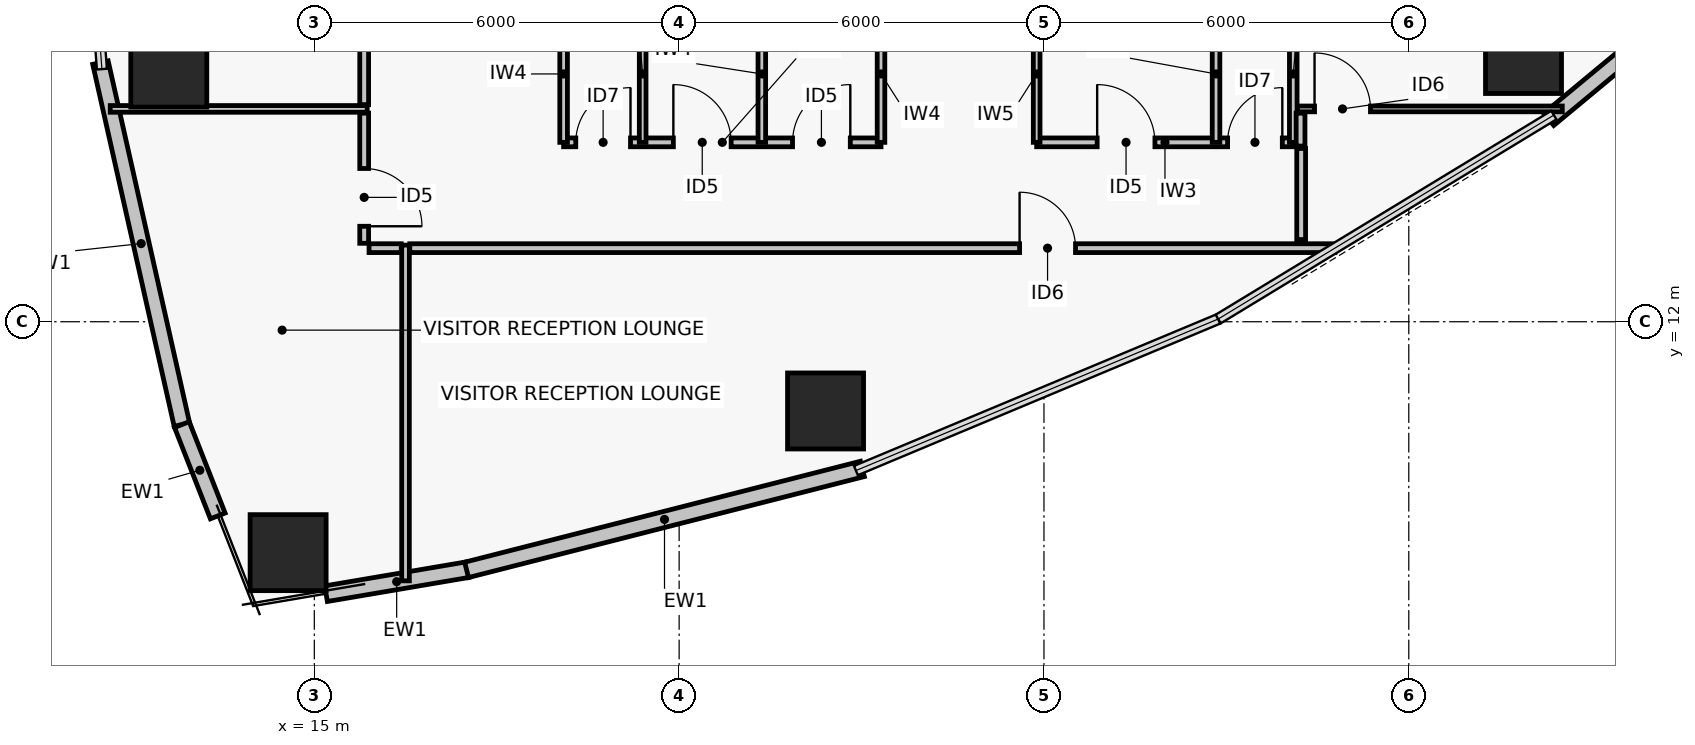
"""IFC4 building model, lengths in metres.
Left out: names, types, materials, properties, quantities, classifications, styles, units other than length and angle.
Written with IfcOpenShell. Run it as: python <this file> out.ifc"""

import sys

from ifc_helpers import new_model, si_unit, direction, frame, frame_2d, origin, origin_2d, place, context, subcontext, project, spatial, rectangle, hollow_rectangle, extrude, element, fill, save


model = new_model("IFC4")
c1 = context("Model", 3, precision=1e-05, world=origin(), true_north=direction((0.0, 1.0)))
c2 = subcontext(c1, "Body", "Model", "MODEL_VIEW")
j1 = project(units=[si_unit("LENGTHUNIT", "METRE"), si_unit("PLANEANGLEUNIT", "RADIAN")], contexts=[c1])
p1 = place(None, origin())
s1 = spatial("IfcSite", under=j1, at=p1, CompositionType="ELEMENT")
p2 = place(p1, origin())
s2 = spatial("IfcBuilding", under=s1, at=p2, CompositionType="ELEMENT")
p3 = place(p2, frame((0.0, 0.0, 75.96)))
s3 = spatial("IfcBuildingStorey", under=s2, at=p3, CompositionType="ELEMENT", Elevation=75.96)
for number, where, z_axis, x_axis in (
    (1, (12.607, 16.154, 0.0), (0.0, 0.0, 1.0), (1.0, 0.0, 0.0)),
    (2, (14.569, 8.203, 0.0), (0.0, 0.0, 1.0), (1.0, 0.0, 0.0)),
    (3, (23.408, 10.533, 0.0), (0.0, 0.0, 1.0), (1.0, 0.0, 0.0)),
    (4, (34.887, 16.378, 0.0), (0.0, 0.0, 1.0), (1.0, 0.0, 0.0)),
):
    element("IfcColumn", number, at=place(p3, frame(where, z_axis=z_axis, x_axis=x_axis)), inside=s3, PredefinedType="COLUMN", context=c2, shape_type="SweptSolid", body=[
        extrude(hollow_rectangle(XDim=1.25, YDim=1.25, WallThickness=0.05, at=origin_2d()), origin(), (0.0, 0.0, 1.0), 3.72),
    ])
p4 = place(p3, frame((12.822, 10.309, 0.0), z_axis=(0.0, 0.0, 1.0), x_axis=(-0.219535044336, 0.975604614743, 0.0)))
e5 = element("IfcWall", 5, at=p4, inside=s3, PredefinedType="PARTITIONING", context=c2, shape_type="SweptSolid", body=[
    extrude(rectangle(XDim=6.102, YDim=0.26, at=frame_2d((3.051, 0.0))), origin(), (0.0, 0.0, 1.0), 3.47),
])
p5 = place(p3, frame((13.412, 8.806, 0.0), z_axis=(0.0, 0.0, 1.0), x_axis=(-0.365488551504, 0.930815835018, 0.0)))
e6 = element("IfcWall", 6, at=p5, inside=s3, PredefinedType="PARTITIONING", context=c2, shape_type="SweptSolid", body=[
    extrude(rectangle(XDim=1.614, YDim=0.26, at=frame_2d((0.807, 0.0))), origin(), (0.0, 0.0, 1.0), 3.47),
])
p6 = place(p3, frame((17.516, 7.922, 0.0), z_axis=(0.0, 0.0, 1.0), x_axis=(-0.985905269947, -0.167304508875, 0.0)))
e7 = element("IfcWall", 7, at=p6, inside=s3, PredefinedType="PARTITIONING", context=c2, shape_type="SweptSolid", body=[
    extrude(rectangle(XDim=2.357, YDim=0.26, at=frame_2d((1.178, 0.0))), origin(), (0.0, 0.0, 1.0), 3.47),
])
p7 = place(p3, frame((24.014, 9.58, 0.0), z_axis=(0.0, 0.0, 1.0), x_axis=(-0.968981437296, -0.247133514876, 0.0)))
e8 = element("IfcWall", 8, at=p7, inside=s3, PredefinedType="PARTITIONING", context=c2, shape_type="SweptSolid", body=[
    extrude(rectangle(XDim=6.718, YDim=0.26, at=frame_2d((3.359, 0.0))), origin(), (0.0, 0.0, 1.0), 3.47),
])
p8 = place(p3, frame((40.472, 19.616, 0.0), z_axis=(0.0, 0.0, 1.0), x_axis=(-0.76975316947, -0.638341646841, 0.0)))
e9 = element("IfcWall", 9, at=p8, inside=s3, PredefinedType="PARTITIONING", context=c2, shape_type="SweptSolid", body=[
    extrude(rectangle(XDim=6.718, YDim=0.26, at=frame_2d((3.359, 0.0))), origin(), (0.0, 0.0, 1.0), 3.47),
])
p9 = place(p3, frame((19.1, 14.95, 0.0), z_axis=(0.0, 0.0, 1.0), x_axis=(1.0, 0.0, 0.0)))
e10 = element("IfcWall", 10, at=p9, inside=s3, PredefinedType="PARTITIONING", context=c2, shape_type="SweptSolid", body=[
    extrude(rectangle(XDim=5.22, YDim=0.145, at=frame_2d((2.61, 0.0))), origin(), (0.0, 0.0, 1.0), 2.6),
])
p10 = place(p9, frame((0.2, 0.0, 0.0)))
e11 = element("IfcOpeningElement", 11, at=p10, cuts=e10, PredefinedType="OPENING", context=c2, shape_type="SweptSolid", body=[
    extrude(rectangle(XDim=0.9, YDim=2.02, at=frame_2d((0.45, 1.01))), frame((0.0, 0.083, 0.0), z_axis=(0.0, -1.0, 0.0), x_axis=(1.0, 0.0, 0.0)), (0.0, 0.0, 1.0), 0.165),
])
p11 = place(p9, frame((1.805, 0.0, 0.0)))
e12 = element("IfcOpeningElement", 12, at=p11, cuts=e10, PredefinedType="OPENING", context=c2, shape_type="SweptSolid", body=[
    extrude(rectangle(XDim=0.95, YDim=2.06, at=frame_2d((0.475, 1.03))), frame((0.0, 0.083, 0.0), z_axis=(0.0, -1.0, 0.0), x_axis=(1.0, 0.0, 0.0)), (0.0, 0.0, 1.0), 0.165),
])
p12 = place(p9, frame((3.765, 0.0, 0.0)))
e13 = element("IfcOpeningElement", 13, at=p12, cuts=e10, PredefinedType="OPENING", context=c2, shape_type="SweptSolid", body=[
    extrude(rectangle(XDim=0.95, YDim=2.06, at=frame_2d((0.475, 1.03))), frame((0.0, 0.083, 0.0), z_axis=(0.0, -1.0, 0.0), x_axis=(1.0, 0.0, 0.0)), (0.0, 0.0, 1.0), 0.165),
])
p13 = place(p3, frame((26.88, 14.95, 0.0), z_axis=(0.0, 0.0, 1.0), x_axis=(1.0, 0.0, 0.0)))
e14 = element("IfcWall", 14, at=p13, inside=s3, PredefinedType="PARTITIONING", context=c2, shape_type="SweptSolid", body=[
    extrude(rectangle(XDim=4.22, YDim=0.145, at=frame_2d((2.11, 0.0))), origin(), (0.0, 0.0, 1.0), 3.0),
])
p14 = place(p13, frame((0.995, 0.0, 0.0)))
e15 = element("IfcOpeningElement", 15, at=p14, cuts=e14, PredefinedType="OPENING", context=c2, shape_type="SweptSolid", body=[
    extrude(rectangle(XDim=0.95, YDim=2.06, at=frame_2d((0.475, 1.03))), frame((0.0, 0.083, 0.0), z_axis=(0.0, -1.0, 0.0), x_axis=(1.0, 0.0, 0.0)), (0.0, 0.0, 1.0), 0.165),
])
p15 = place(p13, frame((3.14, 0.0, 0.0)))
e16 = element("IfcOpeningElement", 16, at=p15, cuts=e14, PredefinedType="OPENING", context=c2, shape_type="SweptSolid", body=[
    extrude(rectangle(XDim=0.9, YDim=2.02, at=frame_2d((0.45, 1.01))), frame((0.0, 0.083, 0.0), z_axis=(0.0, -1.0, 0.0), x_axis=(1.0, 0.0, 0.0)), (0.0, 0.0, 1.0), 0.165),
])
p16 = place(p3, frame((19.1, 14.95, 0.0), z_axis=(0.0, 0.0, 1.0), x_axis=(0.0, 1.0, 0.0)))
e17 = element("IfcWall", 17, at=p16, inside=s3, PredefinedType="PARTITIONING", context=c2, shape_type="SweptSolid", body=[
    extrude(rectangle(XDim=2.25, YDim=0.125, at=frame_2d((1.125, 0.0))), origin(), (0.0, 0.0, 1.0), 2.6),
])
p17 = place(p3, frame((20.4, 14.95, 0.0), z_axis=(0.0, 0.0, 1.0), x_axis=(0.0, 1.0, 0.0)))
e18 = element("IfcWall", 18, at=p17, inside=s3, PredefinedType="PARTITIONING", context=c2, shape_type="SweptSolid", body=[
    extrude(rectangle(XDim=2.25, YDim=0.11, at=frame_2d((1.125, 0.0))), origin(), (0.0, 0.0, 1.0), 2.6),
])
for number, where, z_axis, x_axis in (
    (19, (22.36, 14.95, 0.0), (0.0, 0.0, 1.0), (0.0, 1.0, 0.0)),
    (20, (24.32, 14.95, 0.0), (0.0, 0.0, 1.0), (0.0, 1.0, 0.0)),
):
    element("IfcWall", number, at=place(p3, frame(where, z_axis=z_axis, x_axis=x_axis)), inside=s3, PredefinedType="PARTITIONING", context=c2, shape_type="SweptSolid", body=[
        extrude(rectangle(XDim=2.25, YDim=0.125, at=frame_2d((1.125, 0.0))), origin(), (0.0, 0.0, 1.0), 2.6),
    ])
p18 = place(p3, frame((26.88, 14.95, 0.0), z_axis=(0.0, 0.0, 1.0), x_axis=(0.0, 1.0, 0.0)))
e21 = element("IfcWall", 21, at=p18, inside=s3, PredefinedType="PARTITIONING", context=c2, shape_type="SweptSolid", body=[
    extrude(rectangle(XDim=2.25, YDim=0.11, at=frame_2d((1.125, 0.0))), origin(), (0.0, 0.0, 1.0), 2.6),
])
for number, where, z_axis, x_axis in (
    (22, (29.83, 14.95, 0.0), (0.0, 0.0, 1.0), (0.0, 1.0, 0.0)),
    (23, (31.1, 14.95, 0.0), (0.0, 0.0, 1.0), (0.0, 1.0, 0.0)),
):
    element("IfcWall", number, at=place(p3, frame(where, z_axis=z_axis, x_axis=x_axis)), inside=s3, PredefinedType="PARTITIONING", context=c2, shape_type="SweptSolid", body=[
        extrude(rectangle(XDim=2.25, YDim=0.125, at=frame_2d((1.125, 0.0))), origin(), (0.0, 0.0, 1.0), 2.6),
    ])
p19 = place(p3, frame((15.82, 21.93, 0.0), z_axis=(0.0, 0.0, 1.0), x_axis=(0.0, -1.0, 0.0)))
e24 = element("IfcWall", 24, at=p19, inside=s3, PredefinedType="PARTITIONING", context=c2, shape_type="SweptSolid", body=[
    extrude(rectangle(XDim=6.36, YDim=0.145, at=frame_2d((3.18, 0.0))), origin(), (0.0, 0.0, 1.0), 2.6),
])
p20 = place(p19, frame((0.28, 0.0, 0.0)))
e25 = element("IfcOpeningElement", 25, at=p20, cuts=e24, PredefinedType="OPENING", context=c2, shape_type="SweptSolid", body=[
    extrude(rectangle(XDim=0.95, YDim=2.06, at=frame_2d((0.475, 1.03))), frame((0.0, 0.083, 0.0), z_axis=(0.0, -1.0, 0.0), x_axis=(1.0, 0.0, 0.0)), (0.0, 0.0, 1.0), 0.165),
])
p21 = place(p3, frame((15.82, 15.43, 0.0), z_axis=(0.0, 0.0, 1.0), x_axis=(0.0, -1.0, 0.0)))
e26 = element("IfcWall", 26, at=p21, inside=s3, PredefinedType="PARTITIONING", context=c2, shape_type="SweptSolid", body=[
    extrude(rectangle(XDim=2.14, YDim=0.145, at=frame_2d((1.07, 0.0))), origin(), (0.0, 0.0, 1.0), 3.0),
])
p22 = place(p21, frame((0.91, 0.0, 0.0)))
e27 = element("IfcOpeningElement", 27, at=p22, cuts=e26, PredefinedType="OPENING", context=c2, shape_type="SweptSolid", body=[
    extrude(rectangle(XDim=0.95, YDim=2.06, at=frame_2d((0.475, 1.03))), frame((0.0, 0.083, 0.0), z_axis=(0.0, -1.0, 0.0), x_axis=(1.0, 0.0, 0.0)), (0.0, 0.0, 1.0), 0.165),
])
p23 = place(p3, frame((15.9, 13.21, 0.0), z_axis=(0.0, 0.0, 1.0), x_axis=(1.0, 0.0, 0.0)))
e28 = element("IfcWall", 28, at=p23, inside=s3, PredefinedType="PARTITIONING", context=c2, shape_type="SweptSolid", body=[
    extrude(rectangle(XDim=0.53, YDim=0.145, at=frame_2d((0.265, 0.0))), origin(), (0.0, 0.0, 1.0), 2.6),
])
p24 = place(p3, frame((16.57, 13.21, 0.0), z_axis=(0.0, 0.0, 1.0), x_axis=(1.0, 0.0, 0.0)))
e29 = element("IfcWall", 29, at=p24, inside=s3, PredefinedType="PARTITIONING", context=c2, shape_type="SweptSolid", body=[
    extrude(rectangle(XDim=15.214, YDim=0.145, at=frame_2d((7.607, 0.0))), origin(), (0.0, 0.0, 1.0), 2.6),
])
p25 = place(p24, frame((10.029, 0.0, 0.0)))
e30 = element("IfcOpeningElement", 30, at=p25, cuts=e29, PredefinedType="OPENING", context=c2, shape_type="SweptSolid", body=[
    extrude(rectangle(XDim=0.92, YDim=2.05, at=frame_2d((0.46, 1.025))), frame((0.0, 0.083, 0.0), z_axis=(0.0, -1.0, 0.0), x_axis=(1.0, 0.0, 0.0)), (0.0, 0.0, 1.0), 0.165),
])
p26 = place(p3, frame((31.23, 13.351, 0.0), z_axis=(0.0, 0.0, 1.0), x_axis=(0.0, 1.0, 0.0)))
e31 = element("IfcWall", 31, at=p26, inside=s3, PredefinedType="PARTITIONING", context=c2, shape_type="SweptSolid", body=[
    extrude(rectangle(XDim=1.499, YDim=0.145, at=frame_2d((0.75, 0.0))), origin(), (0.0, 0.0, 1.0), 2.85),
])
p27 = place(p3, frame((31.22, 14.889, 0.0), z_axis=(0.0, 0.0, 1.0), x_axis=(0.0, 1.0, 0.0)))
e32 = element("IfcWall", 32, at=p27, inside=s3, PredefinedType="PARTITIONING", context=c2, shape_type="SweptSolid", body=[
    extrude(rectangle(XDim=0.541, YDim=0.145, at=frame_2d((0.271, 0.0))), origin(), (0.0, 0.0, 1.0), 3.0),
])
p28 = place(p3, frame((16.5, 7.739, 0.0), z_axis=(0.0, 0.0, 1.0), x_axis=(0.0, 1.0, 0.0)))
e33 = element("IfcWall", 33, at=p28, inside=s3, PredefinedType="PARTITIONING", context=c2, shape_type="SweptSolid", body=[
    extrude(rectangle(XDim=5.521, YDim=0.125, at=frame_2d((2.76, 0.0))), origin(), (0.0, 0.0, 1.0), 2.6),
])
p29 = place(p3, frame((11.644, 15.5, 0.0), z_axis=(0.0, 0.0, 1.0), x_axis=(1.0, 0.0, 0.0)))
e34 = element("IfcWall", 34, at=p29, inside=s3, PredefinedType="PARTITIONING", context=c2, shape_type="SweptSolid", body=[
    extrude(rectangle(XDim=4.227, YDim=0.11, at=frame_2d((2.113, 0.0))), origin(), (0.0, 0.0, 1.0), 2.85),
])
p30 = place(p3, frame((31.17, 15.5, 0.0), z_axis=(0.0, 0.0, 1.0), x_axis=(1.0, 0.0, 0.0)))
e35 = element("IfcWall", 35, at=p30, inside=s3, PredefinedType="PARTITIONING", context=c2, shape_type="SweptSolid", body=[
    extrude(rectangle(XDim=4.354, YDim=0.095, at=frame_2d((2.177, 0.0))), origin(), (0.0, 0.0, 1.0), 2.85),
])
p31 = place(p30, frame((0.28, 0.0, 0.0)))
e36 = element("IfcOpeningElement", 36, at=p31, cuts=e35, PredefinedType="OPENING", context=c2, shape_type="SweptSolid", body=[
    extrude(rectangle(XDim=0.92, YDim=2.05, at=frame_2d((0.46, 1.025))), frame((0.0, 0.057, 0.0), z_axis=(0.0, -1.0, 0.0), x_axis=(1.0, 0.0, 0.0)), (0.0, 0.0, 1.0), 0.115),
])
p32 = place(p10, origin())
e37 = element("IfcDoor", 37, at=p32, inside=s3, OperationType="SINGLE_SWING_RIGHT", PredefinedType="DOOR", context=c2, shape_type="SweptSolid", body=[
    extrude(rectangle(XDim=0.9, YDim=2.02, at=frame_2d((0.45, 1.01))), frame((0.0, 0.025, 0.0), z_axis=(0.0, -1.0, 0.0), x_axis=(1.0, 0.0, 0.0)), (0.0, 0.0, 1.0), 0.05),
])
fill(e11, e37)
p33 = place(p11, origin())
e38 = element("IfcDoor", 38, at=p33, inside=s3, OperationType="SINGLE_SWING_LEFT", PredefinedType="DOOR", context=c2, shape_type="SweptSolid", body=[
    extrude(rectangle(XDim=0.95, YDim=2.06, at=frame_2d((0.475, 1.03))), frame((0.0, 0.025, 0.0), z_axis=(0.0, -1.0, 0.0), x_axis=(1.0, 0.0, 0.0)), (0.0, 0.0, 1.0), 0.05),
])
fill(e12, e38)
p34 = place(p12, origin())
e39 = element("IfcDoor", 39, at=p34, inside=s3, OperationType="SINGLE_SWING_RIGHT", PredefinedType="DOOR", context=c2, shape_type="SweptSolid", body=[
    extrude(rectangle(XDim=0.95, YDim=2.06, at=frame_2d((0.475, 1.03))), frame((0.0, 0.025, 0.0), z_axis=(0.0, -1.0, 0.0), x_axis=(1.0, 0.0, 0.0)), (0.0, 0.0, 1.0), 0.05),
])
fill(e13, e39)
p35 = place(p14, origin())
e40 = element("IfcDoor", 40, at=p35, inside=s3, OperationType="SINGLE_SWING_LEFT", PredefinedType="DOOR", context=c2, shape_type="SweptSolid", body=[
    extrude(rectangle(XDim=0.95, YDim=2.06, at=frame_2d((0.475, 1.03))), frame((0.0, 0.025, 0.0), z_axis=(0.0, -1.0, 0.0), x_axis=(1.0, 0.0, 0.0)), (0.0, 0.0, 1.0), 0.05),
])
fill(e15, e40)
p36 = place(p15, origin())
e41 = element("IfcDoor", 41, at=p36, inside=s3, OperationType="SINGLE_SWING_RIGHT", PredefinedType="DOOR", context=c2, shape_type="SweptSolid", body=[
    extrude(rectangle(XDim=0.9, YDim=2.02, at=frame_2d((0.45, 1.01))), frame((0.0, 0.025, 0.0), z_axis=(0.0, -1.0, 0.0), x_axis=(1.0, 0.0, 0.0)), (0.0, 0.0, 1.0), 0.05),
])
fill(e16, e41)
p37 = place(p22, origin())
e42 = element("IfcDoor", 42, at=p37, inside=s3, OperationType="SINGLE_SWING_RIGHT", PredefinedType="DOOR", context=c2, shape_type="SweptSolid", body=[
    extrude(rectangle(XDim=0.95, YDim=2.06, at=frame_2d((0.475, 1.03))), frame((0.0, 0.025, 0.0), z_axis=(0.0, -1.0, 0.0), x_axis=(1.0, 0.0, 0.0)), (0.0, 0.0, 1.0), 0.05),
])
fill(e27, e42)
p38 = place(p25, origin())
e43 = element("IfcDoor", 43, at=p38, inside=s3, OperationType="SINGLE_SWING_LEFT", PredefinedType="DOOR", context=c2, shape_type="SweptSolid", body=[
    extrude(rectangle(XDim=0.92, YDim=2.05, at=frame_2d((0.46, 1.025))), frame((0.0, 0.025, 0.0), z_axis=(0.0, -1.0, 0.0), x_axis=(1.0, 0.0, 0.0)), (0.0, 0.0, 1.0), 0.05),
])
fill(e30, e43)
p39 = place(p31, origin())
e44 = element("IfcDoor", 44, at=p39, inside=s3, OperationType="SINGLE_SWING_LEFT", PredefinedType="DOOR", context=c2, shape_type="SweptSolid", body=[
    extrude(rectangle(XDim=0.92, YDim=2.05, at=frame_2d((0.46, 1.025))), frame((0.0, 0.025, 0.0), z_axis=(0.0, -1.0, 0.0), x_axis=(1.0, 0.0, 0.0)), (0.0, 0.0, 1.0), 0.05),
])
fill(e36, e44)
save(model, sys.argv[1])
